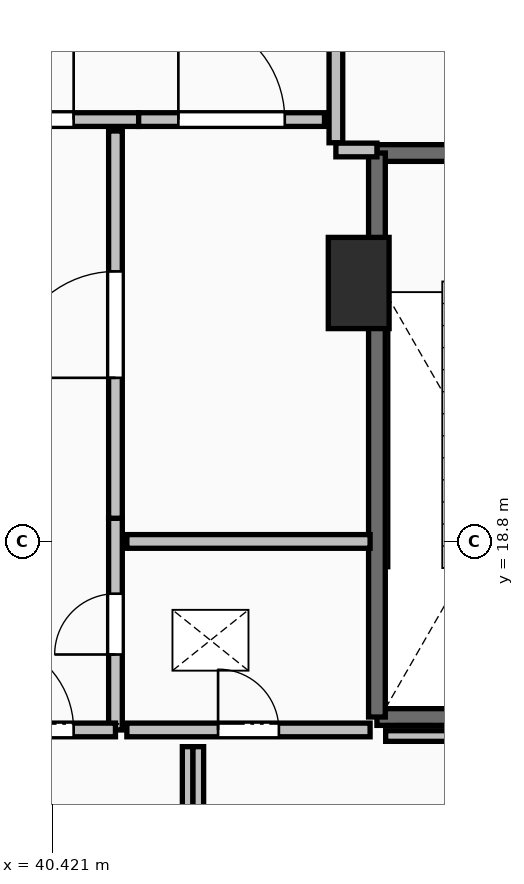
"""IFC4 building model, lengths in metres.
Left out: names, types, materials, properties, quantities, classifications, styles, units other than length and angle.
Written with IfcOpenShell. Run it as: python <this file> out.ifc"""

import sys

from ifc_helpers import new_model, si_unit, direction, frame, frame_2d, origin, origin_2d, place, context, subcontext, project, spatial, rectangle, extrude, element, fill, save


model = new_model("IFC4")
c1 = context("Model", 3, precision=1e-05, world=origin(), true_north=direction((0.0, 1.0)))
c2 = subcontext(c1, "Body", "Model", "MODEL_VIEW")
j1 = project(units=[si_unit("LENGTHUNIT", "METRE"), si_unit("PLANEANGLEUNIT", "RADIAN")], contexts=[c1])
p1 = place(None, origin())
s1 = spatial("IfcSite", under=j1, at=p1, CompositionType="ELEMENT")
p2 = place(p1, origin())
s2 = spatial("IfcBuilding", under=s1, at=p2, CompositionType="ELEMENT")
p3 = place(p2, frame((0.0, 0.0, 124.3)))
s3 = spatial("IfcBuildingStorey", under=s2, at=p3, CompositionType="ELEMENT", Elevation=124.3)
p4 = place(p3, frame((44.45, 22.2, 0.0), z_axis=(0.0, 0.0, 1.0), x_axis=(1.0, 0.0, 0.0)))
e1 = element("IfcColumn", 1, at=p4, inside=s3, PredefinedType="PILASTER", context=c2, shape_type="SweptSolid", body=[
    extrude(rectangle(XDim=0.8, YDim=1.2, at=origin_2d()), origin(), (0.0, 0.0, 1.0), 4.8),
])
p5 = place(p3, frame((44.69, 23.91, 0.0), z_axis=(0.0, 0.0, 1.0), x_axis=(1.0, 0.0, 0.0)))
e2 = element("IfcWall", 2, at=p5, inside=s3, PredefinedType="SOLIDWALL", context=c2, shape_type="SweptSolid", body=[
    extrude(rectangle(XDim=3.37, YDim=0.22, at=frame_2d((1.685, 0.0))), origin(), (0.0, 0.0, 1.0), 4.54),
])
p6 = place(p5, frame((1.135, 0.0, 0.0)))
e3 = element("IfcOpeningElement", 3, at=p6, cuts=e2, PredefinedType="OPENING", context=c2, shape_type="SweptSolid", body=[
    extrude(rectangle(XDim=1.1, YDim=2.15, at=frame_2d((0.55, 1.075))), frame((0.0, 0.125, 0.0), z_axis=(0.0, -1.0, 0.0), x_axis=(1.0, 0.0, 0.0)), (0.0, 0.0, 1.0), 0.25),
])
p7 = place(p3, frame((48.06, 16.49, 0.0), z_axis=(0.0, 0.0, 1.0), x_axis=(-1.0, 0.0, 0.0)))
e4 = element("IfcWall", 4, at=p7, inside=s3, PredefinedType="SOLIDWALL", context=c2, shape_type="SweptSolid", body=[
    extrude(rectangle(XDim=3.37, YDim=0.22, at=frame_2d((1.685, 0.0))), origin(), (0.0, 0.0, 1.0), 4.54),
])
p8 = place(p3, frame((44.69, 16.49, 0.0), z_axis=(0.0, 0.0, 1.0), x_axis=(0.0, 1.0, 0.0)))
e5 = element("IfcWall", 5, at=p8, inside=s3, PredefinedType="SOLIDWALL", context=c2, shape_type="SweptSolid", body=[
    extrude(rectangle(XDim=7.42, YDim=0.22, at=frame_2d((3.71, 0.0))), origin(), (0.0, 0.0, 1.0), 4.54),
])
p9 = place(p3, frame((44.15, 27.955, 0.0), z_axis=(0.0, 0.0, 1.0), x_axis=(0.0, -1.0, 0.0)))
e6 = element("IfcWall", 6, at=p9, inside=s3, PredefinedType="PARTITIONING", context=c2, shape_type="SweptSolid", body=[
    extrude(rectangle(XDim=3.91, YDim=0.18, at=frame_2d((1.955, 0.0))), origin(), (0.0, 0.0, 1.0), 4.54),
])
p10 = place(p9, frame((1.355, 0.0, 0.0)))
e7 = element("IfcOpeningElement", 7, at=p10, cuts=e6, PredefinedType="OPENING", context=c2, shape_type="SweptSolid", body=[
    extrude(rectangle(XDim=1.2, YDim=2.15, at=frame_2d((0.6, 1.075))), frame((0.0, 0.105, 0.0), z_axis=(0.0, -1.0, 0.0), x_axis=(1.0, 0.0, 0.0)), (0.0, 0.0, 1.0), 0.21),
])
p11 = place(p3, frame((44.15, 23.95, 0.0), z_axis=(0.0, 0.0, 1.0), x_axis=(1.0, 0.0, 0.0)))
e8 = element("IfcWall", 8, at=p11, inside=s3, PredefinedType="PARTITIONING", context=c2, shape_type="SweptSolid", body=[
    extrude(rectangle(XDim=0.54, YDim=0.18, at=frame_2d((0.27, 0.0))), origin(), (0.0, 0.0, 1.0), 4.54),
])
p12 = place(p3, frame((38.645, 24.35, 0.0), z_axis=(0.0, 0.0, 1.0), x_axis=(1.0, 0.0, 0.0)))
e9 = element("IfcWall", 9, at=p12, inside=s3, PredefinedType="PARTITIONING", context=c2, shape_type="SweptSolid", body=[
    extrude(rectangle(XDim=2.91, YDim=0.18, at=frame_2d((1.455, 0.0))), origin(), (0.0, 0.0, 1.0), 4.54),
])
p13 = place(p12, frame((0.855, 0.0, 0.0)))
e10 = element("IfcOpeningElement", 10, at=p13, cuts=e9, PredefinedType="OPENING", context=c2, shape_type="SweptSolid", body=[
    extrude(rectangle(XDim=1.2, YDim=2.15, at=frame_2d((0.6, 1.075))), frame((0.0, 0.105, 0.0), z_axis=(0.0, -1.0, 0.0), x_axis=(1.0, 0.0, 0.0)), (0.0, 0.0, 1.0), 0.21),
])
p14 = place(p3, frame((41.555, 24.35, 0.0), z_axis=(0.0, 0.0, 1.0), x_axis=(1.0, 0.0, 0.0)))
e11 = element("IfcWall", 11, at=p14, inside=s3, PredefinedType="PARTITIONING", context=c2, shape_type="SweptSolid", body=[
    extrude(rectangle(XDim=2.445, YDim=0.18, at=frame_2d((1.223, 0.0))), origin(), (0.0, 0.0, 1.0), 4.54),
])
p15 = place(p14, frame((0.522, 0.0, 0.0)))
e12 = element("IfcOpeningElement", 12, at=p15, cuts=e11, PredefinedType="OPENING", context=c2, shape_type="SweptSolid", body=[
    extrude(rectangle(XDim=1.4, YDim=2.2, at=frame_2d((0.7, 1.1))), frame((0.0, 0.105, 0.0), z_axis=(0.0, -1.0, 0.0), x_axis=(1.0, 0.0, 0.0)), (0.0, 0.0, 1.0), 0.21),
])
p16 = place(p3, frame((41.25, 16.32, 0.0), z_axis=(0.0, 0.0, 1.0), x_axis=(0.0, 1.0, 0.0)))
e13 = element("IfcWall", 13, at=p16, inside=s3, PredefinedType="PARTITIONING", context=c2, shape_type="SweptSolid", body=[
    extrude(rectangle(XDim=2.785, YDim=0.18, at=frame_2d((1.393, 0.0))), origin(), (0.0, 0.0, 1.0), 4.54),
])
p17 = place(p16, frame((0.992, 0.0, 0.0)))
e14 = element("IfcOpeningElement", 14, at=p17, cuts=e13, PredefinedType="OPENING", context=c2, shape_type="SweptSolid", body=[
    extrude(rectangle(XDim=0.8, YDim=2.05, at=frame_2d((0.4, 1.025))), frame((0.0, 0.105, 0.0), z_axis=(0.0, -1.0, 0.0), x_axis=(1.0, 0.0, 0.0)), (0.0, 0.0, 1.0), 0.21),
])
p18 = place(p3, frame((41.25, 19.105, 0.0), z_axis=(0.0, 0.0, 1.0), x_axis=(0.0, 1.0, 0.0)))
e15 = element("IfcWall", 15, at=p18, inside=s3, PredefinedType="PARTITIONING", context=c2, shape_type="SweptSolid", body=[
    extrude(rectangle(XDim=5.095, YDim=0.18, at=frame_2d((2.547, 0.0))), origin(), (0.0, 0.0, 1.0), 4.54),
])
p19 = place(p18, frame((1.847, 0.0, 0.0)))
e16 = element("IfcOpeningElement", 16, at=p19, cuts=e15, PredefinedType="OPENING", context=c2, shape_type="SweptSolid", body=[
    extrude(rectangle(XDim=1.4, YDim=2.2, at=frame_2d((0.7, 1.1))), frame((0.0, 0.105, 0.0), z_axis=(0.0, -1.0, 0.0), x_axis=(1.0, 0.0, 0.0)), (0.0, 0.0, 1.0), 0.21),
])
p20 = place(p3, frame((38.95, 16.32, 0.0), z_axis=(0.0, 0.0, 1.0), x_axis=(1.0, 0.0, 0.0)))
e17 = element("IfcWall", 17, at=p20, inside=s3, PredefinedType="PARTITIONING", context=c2, shape_type="SweptSolid", body=[
    extrude(rectangle(XDim=2.3, YDim=0.18, at=frame_2d((1.15, 0.0))), origin(), (0.0, 0.0, 1.0), 4.54),
])
p21 = place(p20, frame((0.55, 0.0, 0.0)))
e18 = element("IfcOpeningElement", 18, at=p21, cuts=e17, PredefinedType="OPENING", context=c2, shape_type="SweptSolid", body=[
    extrude(rectangle(XDim=1.2, YDim=2.15, at=frame_2d((0.6, 1.075))), frame((0.0, 0.105, 0.0), z_axis=(0.0, -1.0, 0.0), x_axis=(1.0, 0.0, 0.0)), (0.0, 0.0, 1.0), 0.21),
])
p22 = place(p3, frame((44.6, 18.8, 0.0), z_axis=(0.0, 0.0, 1.0), x_axis=(-1.0, 0.0, 0.0)))
e19 = element("IfcWall", 19, at=p22, inside=s3, PredefinedType="PARTITIONING", context=c2, shape_type="SweptSolid", body=[
    extrude(rectangle(XDim=3.2, YDim=0.18, at=frame_2d((1.6, 0.0))), origin(), (0.0, 0.0, 1.0), 4.54),
])
p23 = place(p3, frame((41.4, 16.32, 0.0), z_axis=(0.0, 0.0, 1.0), x_axis=(1.0, 0.0, 0.0)))
e20 = element("IfcWall", 20, at=p23, inside=s3, PredefinedType="PARTITIONING", context=c2, shape_type="SweptSolid", body=[
    extrude(rectangle(XDim=3.2, YDim=0.18, at=frame_2d((1.6, 0.0))), origin(), (0.0, 0.0, 1.0), 4.54),
])
p24 = place(p23, frame((1.2, 0.0, 0.0)))
e21 = element("IfcOpeningElement", 21, at=p24, cuts=e20, PredefinedType="OPENING", context=c2, shape_type="SweptSolid", body=[
    extrude(rectangle(XDim=0.8, YDim=2.05, at=frame_2d((0.4, 1.025))), frame((0.0, 0.105, 0.0), z_axis=(0.0, -1.0, 0.0), x_axis=(1.0, 0.0, 0.0)), (0.0, 0.0, 1.0), 0.21),
])
for number, where, z_axis, x_axis in (
    (22, (42.2, 16.1, 0.0), (0.0, 0.0, 1.0), (0.0, -1.0, 0.0)),
    (23, (42.34, 14.27, 0.0), (0.0, 0.0, 1.0), (0.0, 1.0, 0.0)),
):
    element("IfcWall", number, at=place(p3, frame(where, z_axis=z_axis, x_axis=x_axis)), inside=s3, PredefinedType="PARTITIONING", context=c2, shape_type="SweptSolid", body=[
        extrude(rectangle(XDim=1.83, YDim=0.14, at=frame_2d((0.915, 0.0))), origin(), (0.0, 0.0, 1.0), 4.54),
    ])
p25 = place(p3, frame((44.805, 16.24, 0.0), z_axis=(0.0, 0.0, 1.0), x_axis=(1.0, 0.0, 0.0)))
e24 = element("IfcWall", 24, at=p25, inside=s3, PredefinedType="PARTITIONING", context=c2, shape_type="SweptSolid", body=[
    extrude(rectangle(XDim=3.745, YDim=0.14, at=frame_2d((1.873, 0.0))), origin(), (0.0, 0.0, 1.0), 3.522),
])
p26 = place(p13, origin())
e25 = element("IfcDoor", 25, at=p26, inside=s3, OperationType="SINGLE_SWING_RIGHT", PredefinedType="DOOR", context=c2, shape_type="SweptSolid", body=[
    extrude(rectangle(XDim=1.2, YDim=2.15, at=frame_2d((0.6, 1.075))), frame((0.0, 0.025, 0.0), z_axis=(0.0, -1.0, 0.0), x_axis=(1.0, 0.0, 0.0)), (0.0, 0.0, 1.0), 0.05),
])
fill(e10, e25)
p27 = place(p15, origin())
e26 = element("IfcDoor", 26, at=p27, inside=s3, OperationType="DOUBLE_SWING_LEFT", PredefinedType="DOOR", context=c2, shape_type="SweptSolid", body=[
    extrude(rectangle(XDim=1.4, YDim=2.2, at=frame_2d((0.7, 1.1))), frame((0.0, 0.025, 0.0), z_axis=(0.0, -1.0, 0.0), x_axis=(1.0, 0.0, 0.0)), (0.0, 0.0, 1.0), 0.05),
])
fill(e12, e26)
p28 = place(p17, origin())
e27 = element("IfcDoor", 27, at=p28, inside=s3, OperationType="SINGLE_SWING_LEFT", PredefinedType="DOOR", context=c2, shape_type="SweptSolid", body=[
    extrude(rectangle(XDim=0.8, YDim=2.05, at=frame_2d((0.4, 1.025))), frame((0.0, 0.025, 0.0), z_axis=(0.0, -1.0, 0.0), x_axis=(1.0, 0.0, 0.0)), (0.0, 0.0, 1.0), 0.05),
])
fill(e14, e27)
p29 = place(p19, origin())
e28 = element("IfcDoor", 28, at=p29, inside=s3, OperationType="DOUBLE_SWING_LEFT", PredefinedType="DOOR", context=c2, shape_type="SweptSolid", body=[
    extrude(rectangle(XDim=1.4, YDim=2.2, at=frame_2d((0.7, 1.1))), frame((0.0, 0.025, 0.0), z_axis=(0.0, -1.0, 0.0), x_axis=(1.0, 0.0, 0.0)), (0.0, 0.0, 1.0), 0.05),
])
fill(e16, e28)
p30 = place(p21, origin())
e29 = element("IfcDoor", 29, at=p30, inside=s3, OperationType="SINGLE_SWING_LEFT", PredefinedType="DOOR", context=c2, shape_type="SweptSolid", body=[
    extrude(rectangle(XDim=1.2, YDim=2.15, at=frame_2d((0.6, 1.075))), frame((0.0, 0.025, 0.0), z_axis=(0.0, -1.0, 0.0), x_axis=(1.0, 0.0, 0.0)), (0.0, 0.0, 1.0), 0.05),
])
fill(e18, e29)
p31 = place(p24, origin())
e30 = element("IfcDoor", 30, at=p31, inside=s3, OperationType="SINGLE_SWING_LEFT", PredefinedType="DOOR", context=c2, shape_type="SweptSolid", body=[
    extrude(rectangle(XDim=0.8, YDim=2.05, at=frame_2d((0.4, 1.025))), frame((0.0, 0.025, 0.0), z_axis=(0.0, -1.0, 0.0), x_axis=(1.0, 0.0, 0.0)), (0.0, 0.0, 1.0), 0.05),
])
fill(e21, e30)
save(model, sys.argv[1])
